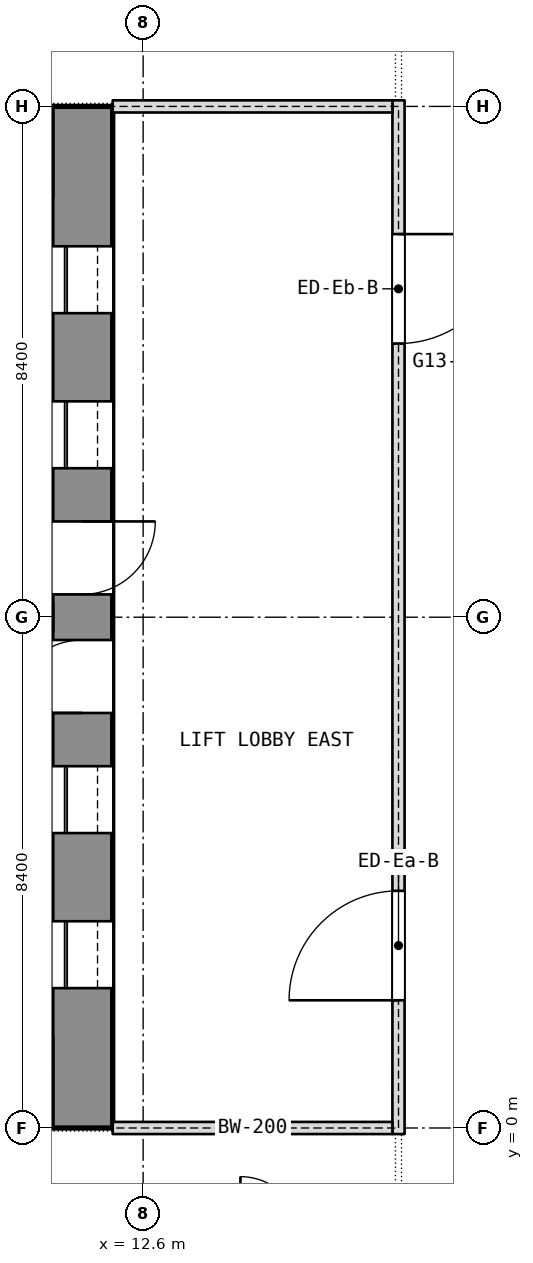
"""IFC4 building model, lengths in metres.
Left out: names, types, materials, properties, quantities, classifications, styles, units other than length and angle.
Written with IfcOpenShell. Run it as: python <this file> out.ifc"""

import sys

from ifc_helpers import new_model, si_unit, direction, frame, frame_2d, origin, place, context, subcontext, project, spatial, rectangle, extrude, element, fill, save


model = new_model("IFC4")
c1 = context("Model", 3, precision=1e-05, world=origin(), true_north=direction((0.0, 1.0)))
c2 = subcontext(c1, "Body", "Model", "MODEL_VIEW")
j1 = project(units=[si_unit("LENGTHUNIT", "METRE"), si_unit("PLANEANGLEUNIT", "RADIAN")], contexts=[c1])
p1 = place(None, origin())
s1 = spatial("IfcSite", under=j1, at=p1, CompositionType="ELEMENT")
p2 = place(p1, origin())
s2 = spatial("IfcBuilding", under=s1, at=p2, CompositionType="ELEMENT")
p3 = place(p2, frame((0.0, 0.0, 148.1)))
s3 = spatial("IfcBuildingStorey", under=s2, at=p3, CompositionType="ELEMENT", Elevation=148.1)
p4 = place(p3, frame((11.6, 0.0, 0.0), z_axis=(0.0, 0.0, 1.0), x_axis=(0.0, 1.0, 0.0)))
e1 = element("IfcWall", 1, at=p4, inside=s3, PredefinedType="SHEAR", context=c2, shape_type="SweptSolid", body=[
    extrude(rectangle(XDim=16.8, YDim=1.0, at=frame_2d((8.4, 0.0))), origin(), (0.0, 0.0, 1.0), 3.6),
])
p5 = place(p4, frame((2.3, 0.0, 0.0)))
e2 = element("IfcOpeningElement", 2, at=p5, cuts=e1, PredefinedType="OPENING", context=c2, shape_type="SweptSolid", body=[
    extrude(rectangle(XDim=1.1, YDim=2.1, at=frame_2d((0.55, 1.05))), frame((0.0, 0.5, 0.0), z_axis=(0.0, -1.0, 0.0), x_axis=(1.0, 0.0, 0.0)), (0.0, 0.0, 1.0), 1.0),
])
p6 = place(p4, frame((4.85, 0.0, 0.0)))
e3 = element("IfcOpeningElement", 3, at=p6, cuts=e1, PredefinedType="OPENING", context=c2, shape_type="SweptSolid", body=[
    extrude(rectangle(XDim=1.1, YDim=2.1, at=frame_2d((0.55, 1.05))), frame((0.0, 0.5, 0.0), z_axis=(0.0, -1.0, 0.0), x_axis=(1.0, 0.0, 0.0)), (0.0, 0.0, 1.0), 1.0),
])
p7 = place(p4, frame((6.825, 0.0, 0.0)))
e4 = element("IfcOpeningElement", 4, at=p7, cuts=e1, PredefinedType="OPENING", context=c2, shape_type="SweptSolid", body=[
    extrude(rectangle(XDim=1.2, YDim=2.1, at=frame_2d((0.6, 1.05))), frame((0.0, 0.5, 0.0), z_axis=(0.0, -1.0, 0.0), x_axis=(1.0, 0.0, 0.0)), (0.0, 0.0, 1.0), 1.0),
])
p8 = place(p4, frame((13.4, 0.0, 0.0)))
e5 = element("IfcOpeningElement", 5, at=p8, cuts=e1, PredefinedType="OPENING", context=c2, shape_type="SweptSolid", body=[
    extrude(rectangle(XDim=1.1, YDim=2.1, at=frame_2d((0.55, 1.05))), frame((0.0, 0.5, 0.0), z_axis=(0.0, -1.0, 0.0), x_axis=(1.0, 0.0, 0.0)), (0.0, 0.0, 1.0), 1.0),
])
p9 = place(p4, frame((10.85, 0.0, 0.0)))
e6 = element("IfcOpeningElement", 6, at=p9, cuts=e1, PredefinedType="OPENING", context=c2, shape_type="SweptSolid", body=[
    extrude(rectangle(XDim=1.1, YDim=2.1, at=frame_2d((0.55, 1.05))), frame((0.0, 0.5, 0.0), z_axis=(0.0, -1.0, 0.0), x_axis=(1.0, 0.0, 0.0)), (0.0, 0.0, 1.0), 1.0),
])
p10 = place(p4, frame((8.775, 0.0, 0.0)))
e7 = element("IfcOpeningElement", 7, at=p10, cuts=e1, PredefinedType="OPENING", context=c2, shape_type="SweptSolid", body=[
    extrude(rectangle(XDim=1.2, YDim=2.1, at=frame_2d((0.6, 1.05))), frame((0.0, 0.5, 0.0), z_axis=(0.0, -1.0, 0.0), x_axis=(1.0, 0.0, 0.0)), (0.0, 0.0, 1.0), 1.0),
])
p11 = place(p3, frame((16.8, -0.1, 0.0), z_axis=(0.0, 0.0, 1.0), x_axis=(0.0, 1.0, 0.0)))
e8 = element("IfcWall", 8, at=p11, inside=s3, PredefinedType="PARTITIONING", context=c2, shape_type="SweptSolid", body=[
    extrude(rectangle(XDim=17.0, YDim=0.2, at=frame_2d((8.5, 0.0))), origin(), (0.0, 0.0, 1.0), 3.34),
])
p12 = place(p11, frame((2.2, 0.0, 0.0)))
e9 = element("IfcOpeningElement", 9, at=p12, cuts=e8, PredefinedType="OPENING", context=c2, shape_type="SweptSolid", body=[
    extrude(rectangle(XDim=1.8, YDim=2.1, at=frame_2d((0.9, 1.05))), frame((0.0, 0.1, 0.0), z_axis=(0.0, -1.0, 0.0), x_axis=(1.0, 0.0, 0.0)), (0.0, 0.0, 1.0), 0.2),
])
p13 = place(p11, frame((13.0, 0.0, 0.0)))
e10 = element("IfcOpeningElement", 10, at=p13, cuts=e8, PredefinedType="OPENING", context=c2, shape_type="SweptSolid", body=[
    extrude(rectangle(XDim=1.8, YDim=2.1, at=frame_2d((0.9, 1.05))), frame((0.0, 0.1, 0.0), z_axis=(0.0, -1.0, 0.0), x_axis=(1.0, 0.0, 0.0)), (0.0, 0.0, 1.0), 0.2),
])
for number, where, z_axis, x_axis in (
    (11, (12.1, 0.0, 0.0), (0.0, 0.0, 1.0), (1.0, 0.0, 0.0)),
    (12, (12.1, 16.8, 0.0), (0.0, 0.0, 1.0), (1.0, 0.0, 0.0)),
):
    element("IfcWall", number, at=place(p3, frame(where, z_axis=z_axis, x_axis=x_axis)), inside=s3, PredefinedType="PARTITIONING", context=c2, shape_type="SweptSolid", body=[
        extrude(rectangle(XDim=4.6, YDim=0.2, at=frame_2d((2.3, 0.0))), origin(), (0.0, 0.0, 1.0), 2.89),
    ])
p14 = place(p5, origin())
e13 = element("IfcDoor", 13, at=p14, inside=s3, OperationType="SLIDING_TO_LEFT", PredefinedType="DOOR", context=c2, shape_type="SweptSolid", body=[
    extrude(rectangle(XDim=1.1, YDim=2.1, at=frame_2d((0.55, 1.05))), frame((0.0, 0.025, 0.0), z_axis=(0.0, -1.0, 0.0), x_axis=(1.0, 0.0, 0.0)), (0.0, 0.0, 1.0), 0.05),
])
fill(e2, e13)
p15 = place(p6, origin())
e14 = element("IfcDoor", 14, at=p15, inside=s3, OperationType="SLIDING_TO_LEFT", PredefinedType="DOOR", context=c2, shape_type="SweptSolid", body=[
    extrude(rectangle(XDim=1.1, YDim=2.1, at=frame_2d((0.55, 1.05))), frame((0.0, 0.025, 0.0), z_axis=(0.0, -1.0, 0.0), x_axis=(1.0, 0.0, 0.0)), (0.0, 0.0, 1.0), 0.05),
])
fill(e3, e14)
p16 = place(p7, origin())
e15 = element("IfcDoor", 15, at=p16, inside=s3, OperationType="SINGLE_SWING_LEFT", PredefinedType="DOOR", context=c2, shape_type="SweptSolid", body=[
    extrude(rectangle(XDim=1.2, YDim=2.1, at=frame_2d((0.6, 1.05))), frame((0.0, 0.025, 0.0), z_axis=(0.0, -1.0, 0.0), x_axis=(1.0, 0.0, 0.0)), (0.0, 0.0, 1.0), 0.05),
])
fill(e4, e15)
p17 = place(p8, origin())
e16 = element("IfcDoor", 16, at=p17, inside=s3, OperationType="SLIDING_TO_LEFT", PredefinedType="DOOR", context=c2, shape_type="SweptSolid", body=[
    extrude(rectangle(XDim=1.1, YDim=2.1, at=frame_2d((0.55, 1.05))), frame((0.0, 0.025, 0.0), z_axis=(0.0, -1.0, 0.0), x_axis=(1.0, 0.0, 0.0)), (0.0, 0.0, 1.0), 0.05),
])
fill(e5, e16)
p18 = place(p9, origin())
e17 = element("IfcDoor", 17, at=p18, inside=s3, OperationType="SLIDING_TO_LEFT", PredefinedType="DOOR", context=c2, shape_type="SweptSolid", body=[
    extrude(rectangle(XDim=1.1, YDim=2.1, at=frame_2d((0.55, 1.05))), frame((0.0, 0.025, 0.0), z_axis=(0.0, -1.0, 0.0), x_axis=(1.0, 0.0, 0.0)), (0.0, 0.0, 1.0), 0.05),
])
fill(e6, e17)
p19 = place(p10, origin())
e18 = element("IfcDoor", 18, at=p19, inside=s3, OperationType="SINGLE_SWING_LEFT", PredefinedType="DOOR", context=c2, shape_type="SweptSolid", body=[
    extrude(rectangle(XDim=1.2, YDim=2.1, at=frame_2d((0.6, 1.05))), frame((0.0, 0.025, 0.0), z_axis=(0.0, -1.0, 0.0), x_axis=(1.0, 0.0, 0.0)), (0.0, 0.0, 1.0), 0.05),
])
fill(e7, e18)
p20 = place(p12, origin())
e19 = element("IfcDoor", 19, at=p20, inside=s3, OperationType="DOUBLE_DOOR_SINGLE_SWING", PredefinedType="DOOR", context=c2, shape_type="SweptSolid", body=[
    extrude(rectangle(XDim=1.8, YDim=2.1, at=frame_2d((0.9, 1.05))), frame((0.0, 0.025, 0.0), z_axis=(0.0, -1.0, 0.0), x_axis=(1.0, 0.0, 0.0)), (0.0, 0.0, 1.0), 0.05),
])
fill(e9, e19)
p21 = place(p13, origin())
e20 = element("IfcDoor", 20, at=p21, inside=s3, OperationType="DOUBLE_DOOR_SINGLE_SWING", PredefinedType="DOOR", context=c2, shape_type="SweptSolid", body=[
    extrude(rectangle(XDim=1.8, YDim=2.1, at=frame_2d((0.9, 1.05))), frame((0.0, 0.025, 0.0), z_axis=(0.0, -1.0, 0.0), x_axis=(1.0, 0.0, 0.0)), (0.0, 0.0, 1.0), 0.05),
])
fill(e10, e20)
save(model, sys.argv[1])
